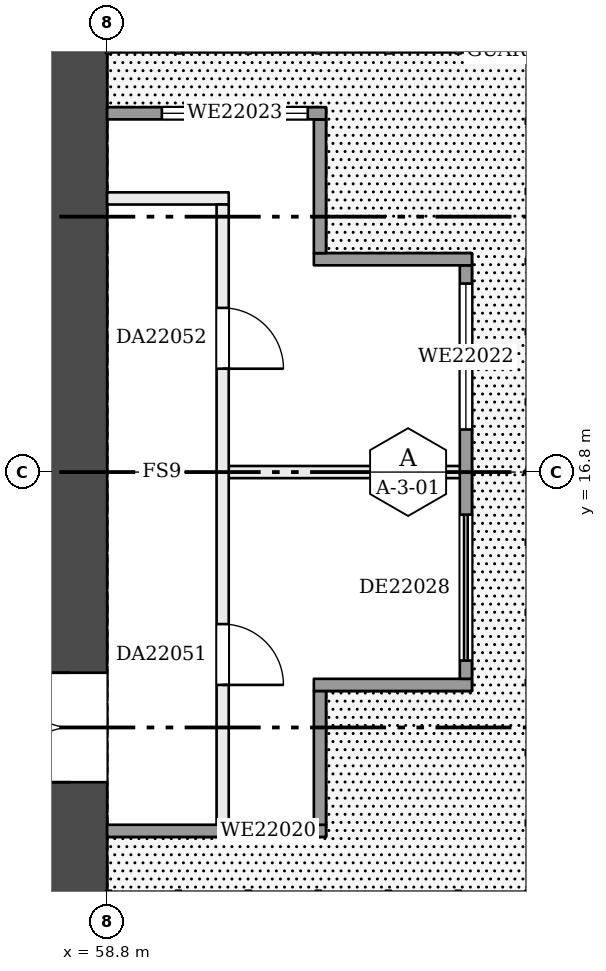
"""IFC4 building model, lengths in metres.
Left out: names, types, materials, properties, quantities, classifications, styles, units other than length and angle.
Written with IfcOpenShell. Run it as: python <this file> out.ifc"""

import sys

from ifc_helpers import new_model, si_unit, direction, frame, frame_2d, origin, place, context, subcontext, project, spatial, rectangle, extrude, element, fill, save


model = new_model("IFC4")
c1 = context("Model", 3, precision=1e-05, world=origin(), true_north=direction((0.0, 1.0)))
c2 = subcontext(c1, "Body", "Model", "MODEL_VIEW")
j1 = project(units=[si_unit("LENGTHUNIT", "METRE"), si_unit("PLANEANGLEUNIT", "RADIAN")], contexts=[c1])
p1 = place(None, origin())
s1 = spatial("IfcSite", under=j1, at=p1, CompositionType="ELEMENT")
p2 = place(p1, origin())
s2 = spatial("IfcBuilding", under=s1, at=p2, CompositionType="ELEMENT")
p3 = place(p2, frame((0.0, 0.0, 91.7)))
s3 = spatial("IfcBuildingStorey", under=s2, at=p3, CompositionType="ELEMENT", Elevation=91.7)
p4 = place(p3, frame((58.2, 9.6, 0.0), z_axis=(0.0, 0.0, 1.0), x_axis=(0.0, 1.0, 0.0)))
e1 = element("IfcWall", 1, at=p4, inside=s3, PredefinedType="SHEAR", context=c2, shape_type="SweptSolid", body=[
    extrude(rectangle(XDim=14.4, YDim=1.2, at=frame_2d((7.2, 0.0))), origin(), (0.0, 0.0, 1.0), 3.22),
])
p5 = place(p4, frame((2.1, 0.0, 0.0)))
e2 = element("IfcOpeningElement", 2, at=p5, cuts=e1, PredefinedType="OPENING", context=c2, shape_type="SweptSolid", body=[
    extrude(rectangle(XDim=1.8, YDim=2.1, at=frame_2d((0.9, 1.05))), frame((0.0, 0.61, 0.0), z_axis=(0.0, -1.0, 0.0), x_axis=(1.0, 0.0, 0.0)), (0.0, 0.0, 1.0), 1.22),
])
p6 = place(p3, frame((60.8, 16.8, 0.0), z_axis=(0.0, 0.0, 1.0), x_axis=(1.0, 0.0, 0.0)))
e3 = element("IfcWall", 3, at=p6, inside=s3, PredefinedType="PARTITIONING", context=c2, shape_type="SweptSolid", body=[
    extrude(rectangle(XDim=3.9, YDim=0.2, at=frame_2d((1.95, 0.0))), origin(), (0.0, 0.0, 1.0), 3.22),
])
p7 = place(p3, frame((58.8, 21.3, 0.0), z_axis=(0.0, 0.0, 1.0), x_axis=(1.0, 0.0, 0.0)))
e4 = element("IfcWall", 4, at=p7, inside=s3, PredefinedType="PARTITIONING", context=c2, shape_type="SweptSolid", body=[
    extrude(rectangle(XDim=2.0, YDim=0.2, at=frame_2d((1.0, 0.0))), origin(), (0.0, 0.0, 1.0), 3.22),
])
p8 = place(p3, frame((60.7, 10.9, 0.0), z_axis=(0.0, 0.0, 1.0), x_axis=(0.0, 1.0, 0.0)))
e5 = element("IfcWall", 5, at=p8, inside=s3, PredefinedType="PARTITIONING", context=c2, shape_type="SweptSolid", body=[
    extrude(rectangle(XDim=10.3, YDim=0.2, at=frame_2d((5.15, 0.0))), origin(), (0.0, 0.0, 1.0), 3.22),
])
p9 = place(p8, frame((2.4, 0.0, 0.0)))
e6 = element("IfcOpeningElement", 6, at=p9, cuts=e5, PredefinedType="OPENING", context=c2, shape_type="SweptSolid", body=[
    extrude(rectangle(XDim=1.0, YDim=2.1, at=frame_2d((0.5, 1.05))), frame((0.0, 0.11, 0.0), z_axis=(0.0, -1.0, 0.0), x_axis=(1.0, 0.0, 0.0)), (0.0, 0.0, 1.0), 0.22),
])
p10 = place(p8, frame((7.6, 0.0, 0.0)))
e7 = element("IfcOpeningElement", 7, at=p10, cuts=e5, PredefinedType="OPENING", context=c2, shape_type="SweptSolid", body=[
    extrude(rectangle(XDim=1.0, YDim=2.1, at=frame_2d((0.5, 1.05))), frame((0.0, 0.11, 0.0), z_axis=(0.0, -1.0, 0.0), x_axis=(1.0, 0.0, 0.0)), (0.0, 0.0, 1.0), 0.22),
])
p11 = place(p3, frame((58.8, 10.9, 0.0), z_axis=(0.0, 0.0, 1.0), x_axis=(1.0, 0.0, 0.0)))
e8 = element("IfcWall", 8, at=p11, inside=s3, PredefinedType="SOLIDWALL", context=c2, shape_type="SweptSolid", body=[
    extrude(rectangle(XDim=3.6, YDim=0.2, at=frame_2d((1.8, 0.0))), origin(), (0.0, 0.0, 1.0), 3.22),
])
p12 = place(p11, frame((2.0, 0.0, 0.9)))
e9 = element("IfcOpeningElement", 9, at=p12, cuts=e8, PredefinedType="OPENING", context=c2, shape_type="SweptSolid", body=[
    extrude(rectangle(XDim=1.3, YDim=1.5, at=frame_2d((0.65, 0.75))), frame((0.0, 0.11, 0.0), z_axis=(0.0, -1.0, 0.0), x_axis=(1.0, 0.0, 0.0)), (0.0, 0.0, 1.0), 0.22),
])
p13 = place(p3, frame((62.3, 11.0, 0.0), z_axis=(0.0, 0.0, 1.0), x_axis=(0.0, 1.0, 0.0)))
e10 = element("IfcWall", 10, at=p13, inside=s3, PredefinedType="SOLIDWALL", context=c2, shape_type="SweptSolid", body=[
    extrude(rectangle(XDim=2.2, YDim=0.2, at=frame_2d((1.1, 0.0))), origin(), (0.0, 0.0, 1.0), 3.22),
])
p14 = place(p3, frame((62.2, 13.3, 0.0), z_axis=(0.0, 0.0, 1.0), x_axis=(1.0, 0.0, 0.0)))
e11 = element("IfcWall", 11, at=p14, inside=s3, PredefinedType="SOLIDWALL", context=c2, shape_type="SweptSolid", body=[
    extrude(rectangle(XDim=2.6, YDim=0.2, at=frame_2d((1.3, 0.0))), origin(), (0.0, 0.0, 1.0), 3.22),
])
p15 = place(p3, frame((64.7, 13.4, 0.0), z_axis=(0.0, 0.0, 1.0), x_axis=(0.0, 1.0, 0.0)))
e12 = element("IfcWall", 12, at=p15, inside=s3, PredefinedType="SOLIDWALL", context=c2, shape_type="SweptSolid", body=[
    extrude(rectangle(XDim=6.8, YDim=0.2, at=frame_2d((3.4, 0.0))), origin(), (0.0, 0.0, 1.0), 3.22),
])
p16 = place(p15, frame((4.1, 0.0, 0.9)))
e13 = element("IfcOpeningElement", 13, at=p16, cuts=e12, PredefinedType="OPENING", context=c2, shape_type="SweptSolid", body=[
    extrude(rectangle(XDim=2.4, YDim=1.5, at=frame_2d((1.2, 0.75))), frame((0.0, 0.11, 0.0), z_axis=(0.0, -1.0, 0.0), x_axis=(1.0, 0.0, 0.0)), (0.0, 0.0, 1.0), 0.22),
])
p17 = place(p15, frame((0.3, 0.0, 0.0)))
e14 = element("IfcOpeningElement", 14, at=p17, cuts=e12, PredefinedType="OPENING", context=c2, shape_type="SweptSolid", body=[
    extrude(rectangle(XDim=2.4, YDim=2.2, at=frame_2d((1.2, 1.1))), frame((0.0, 0.11, 0.0), z_axis=(0.0, -1.0, 0.0), x_axis=(1.0, 0.0, 0.0)), (0.0, 0.0, 1.0), 0.22),
])
p18 = place(p3, frame((64.8, 20.3, 0.0), z_axis=(0.0, 0.0, 1.0), x_axis=(-1.0, 0.0, 0.0)))
e15 = element("IfcWall", 15, at=p18, inside=s3, PredefinedType="SOLIDWALL", context=c2, shape_type="SweptSolid", body=[
    extrude(rectangle(XDim=2.6, YDim=0.2, at=frame_2d((1.3, 0.0))), origin(), (0.0, 0.0, 1.0), 3.22),
])
p19 = place(p3, frame((62.3, 20.4, 0.0), z_axis=(0.0, 0.0, 1.0), x_axis=(0.0, 1.0, 0.0)))
e16 = element("IfcWall", 16, at=p19, inside=s3, PredefinedType="SOLIDWALL", context=c2, shape_type="SweptSolid", body=[
    extrude(rectangle(XDim=2.2, YDim=0.2, at=frame_2d((1.1, 0.0))), origin(), (0.0, 0.0, 1.0), 3.22),
])
p20 = place(p3, frame((62.4, 22.7, 0.0), z_axis=(0.0, 0.0, 1.0), x_axis=(-1.0, 0.0, 0.0)))
e17 = element("IfcWall", 17, at=p20, inside=s3, PredefinedType="SOLIDWALL", context=c2, shape_type="SweptSolid", body=[
    extrude(rectangle(XDim=3.6, YDim=0.2, at=frame_2d((1.8, 0.0))), origin(), (0.0, 0.0, 1.0), 3.22),
])
p21 = place(p20, frame((0.3, 0.0, 0.9)))
e18 = element("IfcOpeningElement", 18, at=p21, cuts=e17, PredefinedType="OPENING", context=c2, shape_type="SweptSolid", body=[
    extrude(rectangle(XDim=2.4, YDim=1.5, at=frame_2d((1.2, 0.75))), frame((0.0, 0.11, 0.0), z_axis=(0.0, -1.0, 0.0), x_axis=(1.0, 0.0, 0.0)), (0.0, 0.0, 1.0), 0.22),
])
p22 = place(p5, origin())
e19 = element("IfcDoor", 19, at=p22, inside=s3, OperationType="DOUBLE_DOOR_SINGLE_SWING", PredefinedType="DOOR", context=c2, shape_type="SweptSolid", body=[
    extrude(rectangle(XDim=1.8, YDim=2.1, at=frame_2d((0.9, 1.05))), frame((0.0, 0.025, 0.0), z_axis=(0.0, -1.0, 0.0), x_axis=(1.0, 0.0, 0.0)), (0.0, 0.0, 1.0), 0.05),
])
fill(e2, e19)
p23 = place(p9, frame((1.0, 0.0, 0.0), z_axis=(0.0, 0.0, 1.0), x_axis=(-1.0, 0.0, 0.0)))
e20 = element("IfcDoor", 20, at=p23, inside=s3, OperationType="SINGLE_SWING_RIGHT", PredefinedType="DOOR", context=c2, shape_type="SweptSolid", body=[
    extrude(rectangle(XDim=1.0, YDim=2.1, at=frame_2d((0.5, 1.05))), frame((0.0, 0.025, 0.0), z_axis=(0.0, -1.0, 0.0), x_axis=(1.0, 0.0, 0.0)), (0.0, 0.0, 1.0), 0.05),
])
fill(e6, e20)
p24 = place(p10, frame((1.0, 0.0, 0.0), z_axis=(0.0, 0.0, 1.0), x_axis=(-1.0, 0.0, 0.0)))
e21 = element("IfcDoor", 21, at=p24, inside=s3, OperationType="SINGLE_SWING_RIGHT", PredefinedType="DOOR", context=c2, shape_type="SweptSolid", body=[
    extrude(rectangle(XDim=1.0, YDim=2.1, at=frame_2d((0.5, 1.05))), frame((0.0, 0.025, 0.0), z_axis=(0.0, -1.0, 0.0), x_axis=(1.0, 0.0, 0.0)), (0.0, 0.0, 1.0), 0.05),
])
fill(e7, e21)
p25 = place(p12, origin())
e22 = element("IfcWindow", 22, at=p25, inside=s3, PartitioningType="SINGLE_PANEL", PredefinedType="WINDOW", context=c2, shape_type="SweptSolid", body=[
    extrude(rectangle(XDim=1.3, YDim=1.5, at=frame_2d((0.65, 0.75))), frame((0.0, 0.03, 0.0), z_axis=(0.0, -1.0, 0.0), x_axis=(1.0, 0.0, 0.0)), (0.0, 0.0, 1.0), 0.06),
])
fill(e9, e22)
p26 = place(p16, origin())
e23 = element("IfcWindow", 23, at=p26, inside=s3, PartitioningType="SINGLE_PANEL", PredefinedType="WINDOW", context=c2, shape_type="SweptSolid", body=[
    extrude(rectangle(XDim=2.4, YDim=1.5, at=frame_2d((1.2, 0.75))), frame((0.0, 0.03, 0.0), z_axis=(0.0, -1.0, 0.0), x_axis=(1.0, 0.0, 0.0)), (0.0, 0.0, 1.0), 0.06),
])
fill(e13, e23)
p27 = place(p21, origin())
e24 = element("IfcWindow", 24, at=p27, inside=s3, PartitioningType="SINGLE_PANEL", PredefinedType="WINDOW", context=c2, shape_type="SweptSolid", body=[
    extrude(rectangle(XDim=2.4, YDim=1.5, at=frame_2d((1.2, 0.75))), frame((0.0, 0.03, 0.0), z_axis=(0.0, -1.0, 0.0), x_axis=(1.0, 0.0, 0.0)), (0.0, 0.0, 1.0), 0.06),
])
fill(e18, e24)
p28 = place(p17, origin())
e25 = element("IfcDoor", 25, at=p28, inside=s3, OperationType="DOUBLE_DOOR_SLIDING", PredefinedType="DOOR", context=c2, shape_type="SweptSolid", body=[
    extrude(rectangle(XDim=2.4, YDim=2.2, at=frame_2d((1.2, 1.1))), frame((0.0, 0.025, 0.0), z_axis=(0.0, -1.0, 0.0), x_axis=(1.0, 0.0, 0.0)), (0.0, 0.0, 1.0), 0.05),
])
fill(e14, e25)
save(model, sys.argv[1])
